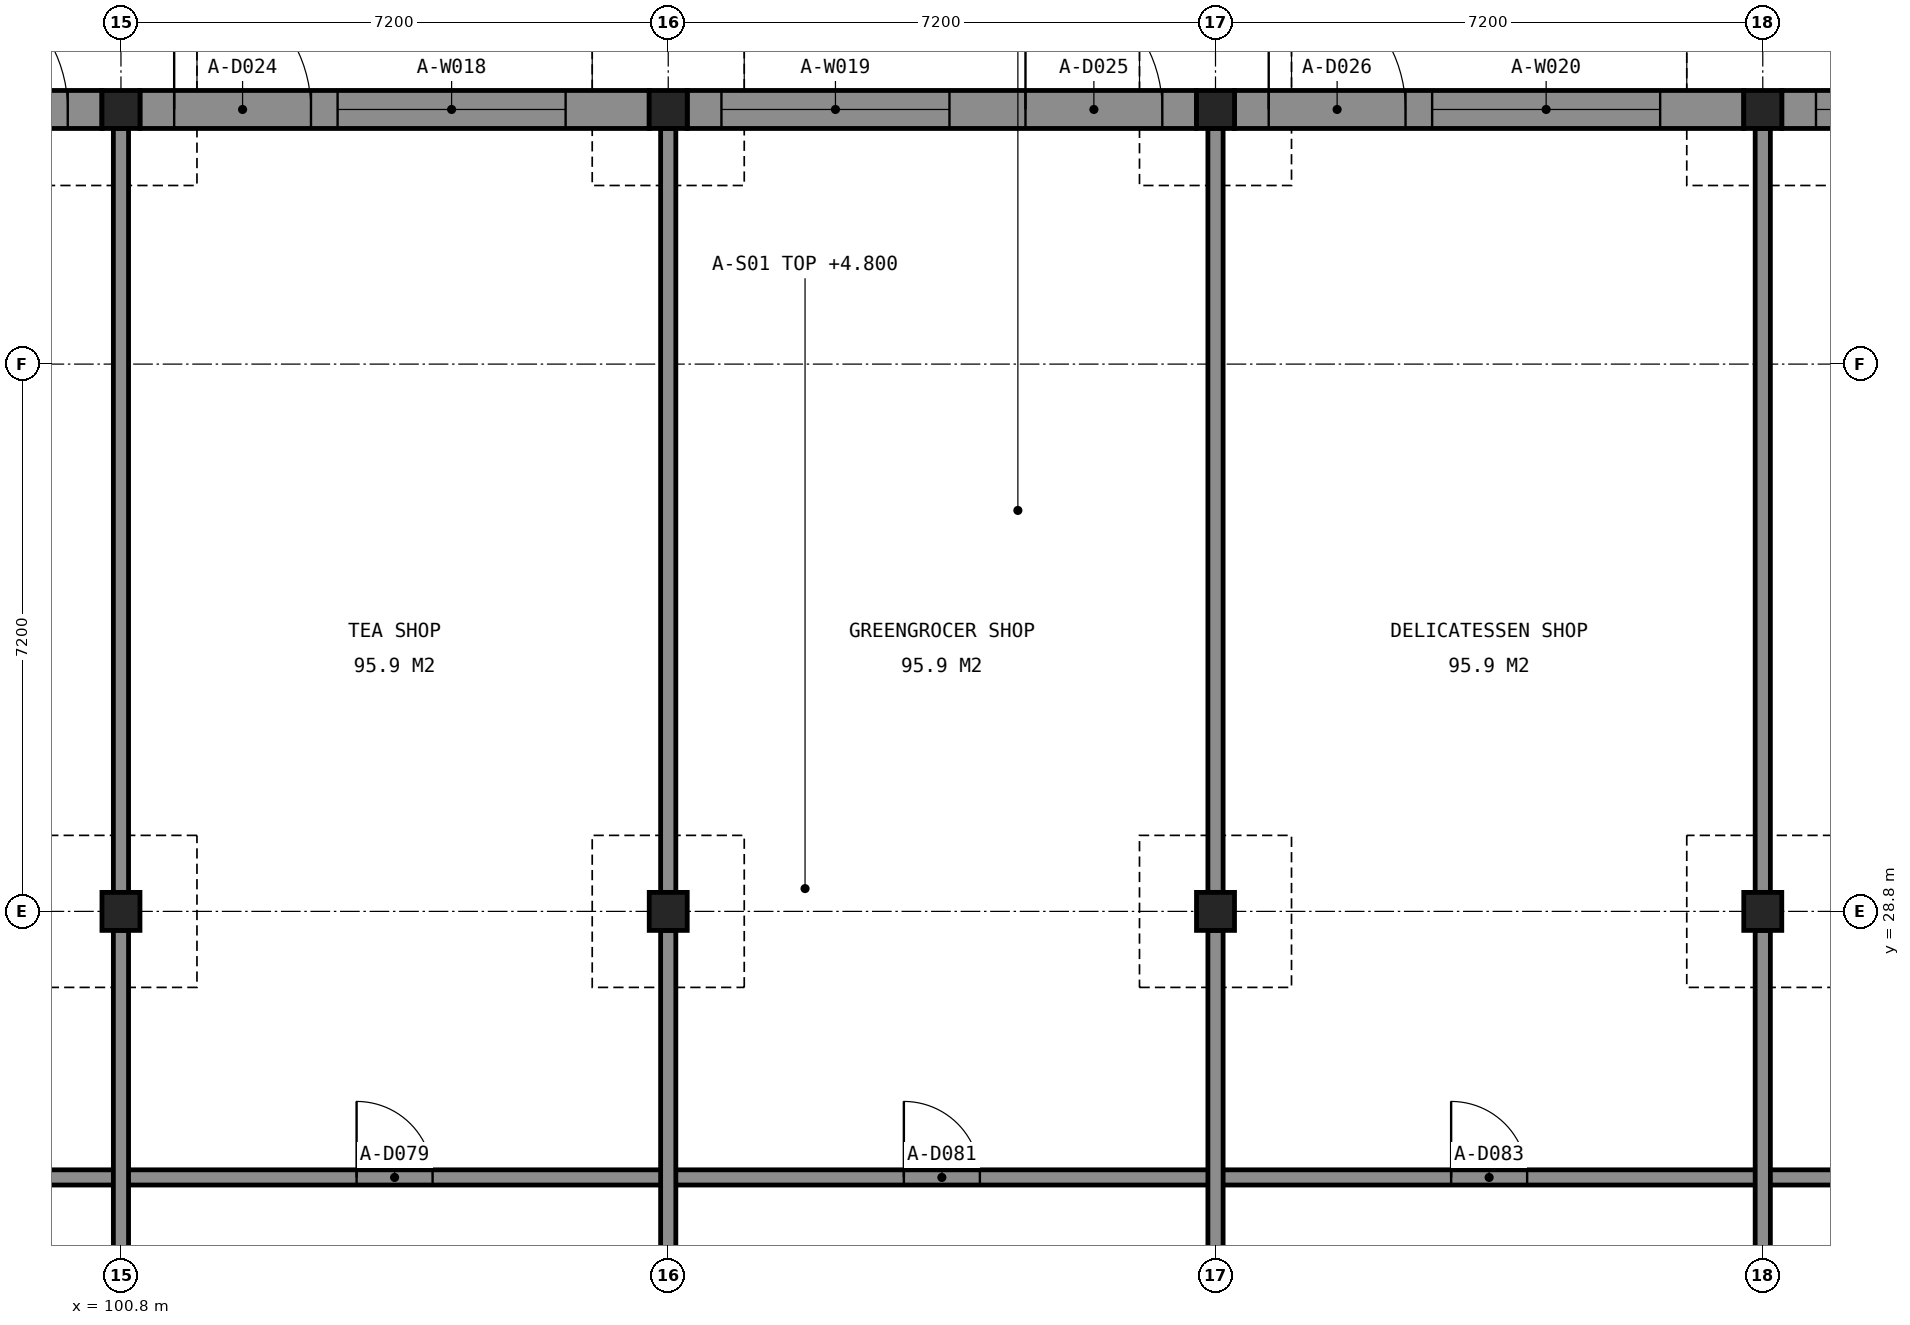
"""IFC4 building model, lengths in metres.
Left out: names, types, materials, properties, quantities, classifications, styles, units other than length and angle.
Written with IfcOpenShell. Run it as: python <this file> out.ifc"""

import sys

from ifc_helpers import new_model, si_unit, direction, frame, frame_2d, origin, origin_2d, place, context, subcontext, project, spatial, rectangle, extrude, element, fill, save


model = new_model("IFC4")
c1 = context("Model", 3, precision=1e-05, world=origin(), true_north=direction((0.0, 1.0)))
c2 = subcontext(c1, "Body", "Model", "MODEL_VIEW")
j1 = project(units=[si_unit("LENGTHUNIT", "METRE"), si_unit("PLANEANGLEUNIT", "RADIAN")], contexts=[c1])
p1 = place(None, origin())
s1 = spatial("IfcSite", under=j1, at=p1, CompositionType="ELEMENT")
p2 = place(p1, origin())
s2 = spatial("IfcBuilding", under=s1, at=p2, CompositionType="ELEMENT")
p3 = place(p2, origin())
s3 = spatial("IfcBuildingStorey", under=s2, at=p3, CompositionType="ELEMENT", Elevation=0.0)
for number, where, z_axis, x_axis in (
    (1, (100.8, 39.35, 0.0), (0.0, 0.0, 1.0), (1.0, 0.0, 0.0)),
    (2, (108.0, 39.35, 0.0), (0.0, 0.0, 1.0), (1.0, 0.0, 0.0)),
    (3, (115.2, 39.35, 0.0), (0.0, 0.0, 1.0), (1.0, 0.0, 0.0)),
    (4, (122.4, 39.35, 0.0), (0.0, 0.0, 1.0), (1.0, 0.0, 0.0)),
    (5, (100.8, 28.8, 0.0), (0.0, 0.0, 1.0), (1.0, 0.0, 0.0)),
    (6, (108.0, 28.8, 0.0), (0.0, 0.0, 1.0), (1.0, 0.0, 0.0)),
    (7, (115.2, 28.8, 0.0), (0.0, 0.0, 1.0), (1.0, 0.0, 0.0)),
    (8, (122.4, 28.8, 0.0), (0.0, 0.0, 1.0), (1.0, 0.0, 0.0)),
):
    element("IfcColumn", number, at=place(p3, frame(where, z_axis=z_axis, x_axis=x_axis)), inside=s3, PredefinedType="COLUMN", context=c2, shape_type="SweptSolid", body=[
        extrude(rectangle(XDim=0.5, YDim=0.5, at=origin_2d()), origin(), (0.0, 0.0, 1.0), 3.7),
    ])
p4 = place(p3, frame((93.85, 39.35, 0.0), z_axis=(0.0, 0.0, 1.0), x_axis=(1.0, 0.0, 0.0)))
e9 = element("IfcWall", 9, at=p4, inside=s3, PredefinedType="SOLIDWALL", context=c2, shape_type="SweptSolid", body=[
    extrude(rectangle(XDim=6.7, YDim=0.5, at=frame_2d((3.35, 0.0))), origin(), (0.0, 0.0, 1.0), 3.6),
])
p5 = place(p4, frame((4.45, 0.0, 0.0)))
e10 = element("IfcOpeningElement", 10, at=p5, cuts=e9, PredefinedType="OPENING", context=c2, shape_type="SweptSolid", body=[
    extrude(rectangle(XDim=1.8, YDim=2.4, at=frame_2d((0.9, 1.2))), frame((0.0, 0.26, 0.0), z_axis=(0.0, -1.0, 0.0), x_axis=(1.0, 0.0, 0.0)), (0.0, 0.0, 1.0), 0.52),
])
p6 = place(p4, frame((0.45, 0.0, 0.6)))
e11 = element("IfcOpeningElement", 11, at=p6, cuts=e9, PredefinedType="OPENING", context=c2, shape_type="SweptSolid", body=[
    extrude(rectangle(XDim=3.0, YDim=2.4, at=frame_2d((1.5, 1.2))), frame((0.0, 0.26, 0.0), z_axis=(0.0, -1.0, 0.0), x_axis=(1.0, 0.0, 0.0)), (0.0, 0.0, 1.0), 0.52),
])
p7 = place(p3, frame((101.05, 39.35, 0.0), z_axis=(0.0, 0.0, 1.0), x_axis=(1.0, 0.0, 0.0)))
e12 = element("IfcWall", 12, at=p7, inside=s3, PredefinedType="SOLIDWALL", context=c2, shape_type="SweptSolid", body=[
    extrude(rectangle(XDim=6.7, YDim=0.5, at=frame_2d((3.35, 0.0))), origin(), (0.0, 0.0, 1.0), 3.6),
])
p8 = place(p7, frame((0.45, 0.0, 0.0)))
e13 = element("IfcOpeningElement", 13, at=p8, cuts=e12, PredefinedType="OPENING", context=c2, shape_type="SweptSolid", body=[
    extrude(rectangle(XDim=1.8, YDim=2.4, at=frame_2d((0.9, 1.2))), frame((0.0, 0.26, 0.0), z_axis=(0.0, -1.0, 0.0), x_axis=(1.0, 0.0, 0.0)), (0.0, 0.0, 1.0), 0.52),
])
p9 = place(p7, frame((2.6, 0.0, 0.6)))
e14 = element("IfcOpeningElement", 14, at=p9, cuts=e12, PredefinedType="OPENING", context=c2, shape_type="SweptSolid", body=[
    extrude(rectangle(XDim=3.0, YDim=2.4, at=frame_2d((1.5, 1.2))), frame((0.0, 0.26, 0.0), z_axis=(0.0, -1.0, 0.0), x_axis=(1.0, 0.0, 0.0)), (0.0, 0.0, 1.0), 0.52),
])
p10 = place(p3, frame((108.25, 39.35, 0.0), z_axis=(0.0, 0.0, 1.0), x_axis=(1.0, 0.0, 0.0)))
e15 = element("IfcWall", 15, at=p10, inside=s3, PredefinedType="SOLIDWALL", context=c2, shape_type="SweptSolid", body=[
    extrude(rectangle(XDim=6.7, YDim=0.5, at=frame_2d((3.35, 0.0))), origin(), (0.0, 0.0, 1.0), 3.6),
])
p11 = place(p10, frame((4.45, 0.0, 0.0)))
e16 = element("IfcOpeningElement", 16, at=p11, cuts=e15, PredefinedType="OPENING", context=c2, shape_type="SweptSolid", body=[
    extrude(rectangle(XDim=1.8, YDim=2.4, at=frame_2d((0.9, 1.2))), frame((0.0, 0.26, 0.0), z_axis=(0.0, -1.0, 0.0), x_axis=(1.0, 0.0, 0.0)), (0.0, 0.0, 1.0), 0.52),
])
p12 = place(p10, frame((0.45, 0.0, 0.6)))
e17 = element("IfcOpeningElement", 17, at=p12, cuts=e15, PredefinedType="OPENING", context=c2, shape_type="SweptSolid", body=[
    extrude(rectangle(XDim=3.0, YDim=2.4, at=frame_2d((1.5, 1.2))), frame((0.0, 0.26, 0.0), z_axis=(0.0, -1.0, 0.0), x_axis=(1.0, 0.0, 0.0)), (0.0, 0.0, 1.0), 0.52),
])
p13 = place(p3, frame((115.45, 39.35, 0.0), z_axis=(0.0, 0.0, 1.0), x_axis=(1.0, 0.0, 0.0)))
e18 = element("IfcWall", 18, at=p13, inside=s3, PredefinedType="SOLIDWALL", context=c2, shape_type="SweptSolid", body=[
    extrude(rectangle(XDim=6.7, YDim=0.5, at=frame_2d((3.35, 0.0))), origin(), (0.0, 0.0, 1.0), 3.6),
])
p14 = place(p13, frame((0.45, 0.0, 0.0)))
e19 = element("IfcOpeningElement", 19, at=p14, cuts=e18, PredefinedType="OPENING", context=c2, shape_type="SweptSolid", body=[
    extrude(rectangle(XDim=1.8, YDim=2.4, at=frame_2d((0.9, 1.2))), frame((0.0, 0.26, 0.0), z_axis=(0.0, -1.0, 0.0), x_axis=(1.0, 0.0, 0.0)), (0.0, 0.0, 1.0), 0.52),
])
p15 = place(p13, frame((2.6, 0.0, 0.6)))
e20 = element("IfcOpeningElement", 20, at=p15, cuts=e18, PredefinedType="OPENING", context=c2, shape_type="SweptSolid", body=[
    extrude(rectangle(XDim=3.0, YDim=2.4, at=frame_2d((1.5, 1.2))), frame((0.0, 0.26, 0.0), z_axis=(0.0, -1.0, 0.0), x_axis=(1.0, 0.0, 0.0)), (0.0, 0.0, 1.0), 0.52),
])
p16 = place(p3, frame((122.65, 39.35, 0.0), z_axis=(0.0, 0.0, 1.0), x_axis=(1.0, 0.0, 0.0)))
e21 = element("IfcWall", 21, at=p16, inside=s3, PredefinedType="SOLIDWALL", context=c2, shape_type="SweptSolid", body=[
    extrude(rectangle(XDim=6.7, YDim=0.5, at=frame_2d((3.35, 0.0))), origin(), (0.0, 0.0, 1.0), 3.6),
])
p17 = place(p16, frame((4.45, 0.0, 0.0)))
e22 = element("IfcOpeningElement", 22, at=p17, cuts=e21, PredefinedType="OPENING", context=c2, shape_type="SweptSolid", body=[
    extrude(rectangle(XDim=1.8, YDim=2.4, at=frame_2d((0.9, 1.2))), frame((0.0, 0.26, 0.0), z_axis=(0.0, -1.0, 0.0), x_axis=(1.0, 0.0, 0.0)), (0.0, 0.0, 1.0), 0.52),
])
p18 = place(p16, frame((0.45, 0.0, 0.6)))
e23 = element("IfcOpeningElement", 23, at=p18, cuts=e21, PredefinedType="OPENING", context=c2, shape_type="SweptSolid", body=[
    extrude(rectangle(XDim=3.0, YDim=2.4, at=frame_2d((1.5, 1.2))), frame((0.0, 0.26, 0.0), z_axis=(0.0, -1.0, 0.0), x_axis=(1.0, 0.0, 0.0)), (0.0, 0.0, 1.0), 0.52),
])
p19 = place(p3, frame((57.7, 25.3, 0.0), z_axis=(0.0, 0.0, 1.0), x_axis=(1.0, 0.0, 0.0)))
e24 = element("IfcWall", 24, at=p19, inside=s3, PredefinedType="PARTITIONING", context=c2, shape_type="SweptSolid", body=[
    extrude(rectangle(XDim=86.2, YDim=0.2, at=frame_2d((43.1, 0.0))), origin(), (0.0, 0.0, 1.0), 3.5),
])
p20 = place(p19, frame((3.0, 0.0, 0.0)))
e25 = element("IfcOpeningElement", 25, at=p20, cuts=e24, PredefinedType="OPENING", context=c2, shape_type="SweptSolid", body=[
    extrude(rectangle(XDim=1.0, YDim=2.1, at=frame_2d((0.5, 1.05))), frame((0.0, 0.11, 0.0), z_axis=(0.0, -1.0, 0.0), x_axis=(1.0, 0.0, 0.0)), (0.0, 0.0, 1.0), 0.22),
])
p21 = place(p19, frame((10.2, 0.0, 0.0)))
e26 = element("IfcOpeningElement", 26, at=p21, cuts=e24, PredefinedType="OPENING", context=c2, shape_type="SweptSolid", body=[
    extrude(rectangle(XDim=1.0, YDim=2.1, at=frame_2d((0.5, 1.05))), frame((0.0, 0.11, 0.0), z_axis=(0.0, -1.0, 0.0), x_axis=(1.0, 0.0, 0.0)), (0.0, 0.0, 1.0), 0.22),
])
p22 = place(p19, frame((17.4, 0.0, 0.0)))
e27 = element("IfcOpeningElement", 27, at=p22, cuts=e24, PredefinedType="OPENING", context=c2, shape_type="SweptSolid", body=[
    extrude(rectangle(XDim=1.0, YDim=2.1, at=frame_2d((0.5, 1.05))), frame((0.0, 0.11, 0.0), z_axis=(0.0, -1.0, 0.0), x_axis=(1.0, 0.0, 0.0)), (0.0, 0.0, 1.0), 0.22),
])
p23 = place(p19, frame((24.6, 0.0, 0.0)))
e28 = element("IfcOpeningElement", 28, at=p23, cuts=e24, PredefinedType="OPENING", context=c2, shape_type="SweptSolid", body=[
    extrude(rectangle(XDim=1.0, YDim=2.1, at=frame_2d((0.5, 1.05))), frame((0.0, 0.11, 0.0), z_axis=(0.0, -1.0, 0.0), x_axis=(1.0, 0.0, 0.0)), (0.0, 0.0, 1.0), 0.22),
])
p24 = place(p19, frame((31.8, 0.0, 0.0)))
e29 = element("IfcOpeningElement", 29, at=p24, cuts=e24, PredefinedType="OPENING", context=c2, shape_type="SweptSolid", body=[
    extrude(rectangle(XDim=1.0, YDim=2.1, at=frame_2d((0.5, 1.05))), frame((0.0, 0.11, 0.0), z_axis=(0.0, -1.0, 0.0), x_axis=(1.0, 0.0, 0.0)), (0.0, 0.0, 1.0), 0.22),
])
p25 = place(p19, frame((39.0, 0.0, 0.0)))
e30 = element("IfcOpeningElement", 30, at=p25, cuts=e24, PredefinedType="OPENING", context=c2, shape_type="SweptSolid", body=[
    extrude(rectangle(XDim=1.0, YDim=2.1, at=frame_2d((0.5, 1.05))), frame((0.0, 0.11, 0.0), z_axis=(0.0, -1.0, 0.0), x_axis=(1.0, 0.0, 0.0)), (0.0, 0.0, 1.0), 0.22),
])
p26 = place(p19, frame((46.2, 0.0, 0.0)))
e31 = element("IfcOpeningElement", 31, at=p26, cuts=e24, PredefinedType="OPENING", context=c2, shape_type="SweptSolid", body=[
    extrude(rectangle(XDim=1.0, YDim=2.1, at=frame_2d((0.5, 1.05))), frame((0.0, 0.11, 0.0), z_axis=(0.0, -1.0, 0.0), x_axis=(1.0, 0.0, 0.0)), (0.0, 0.0, 1.0), 0.22),
])
p27 = place(p19, frame((53.4, 0.0, 0.0)))
e32 = element("IfcOpeningElement", 32, at=p27, cuts=e24, PredefinedType="OPENING", context=c2, shape_type="SweptSolid", body=[
    extrude(rectangle(XDim=1.0, YDim=2.1, at=frame_2d((0.5, 1.05))), frame((0.0, 0.11, 0.0), z_axis=(0.0, -1.0, 0.0), x_axis=(1.0, 0.0, 0.0)), (0.0, 0.0, 1.0), 0.22),
])
p28 = place(p19, frame((60.6, 0.0, 0.0)))
e33 = element("IfcOpeningElement", 33, at=p28, cuts=e24, PredefinedType="OPENING", context=c2, shape_type="SweptSolid", body=[
    extrude(rectangle(XDim=1.0, YDim=2.1, at=frame_2d((0.5, 1.05))), frame((0.0, 0.11, 0.0), z_axis=(0.0, -1.0, 0.0), x_axis=(1.0, 0.0, 0.0)), (0.0, 0.0, 1.0), 0.22),
])
p29 = place(p19, frame((67.8, 0.0, 0.0)))
e34 = element("IfcOpeningElement", 34, at=p29, cuts=e24, PredefinedType="OPENING", context=c2, shape_type="SweptSolid", body=[
    extrude(rectangle(XDim=1.0, YDim=2.1, at=frame_2d((0.5, 1.05))), frame((0.0, 0.11, 0.0), z_axis=(0.0, -1.0, 0.0), x_axis=(1.0, 0.0, 0.0)), (0.0, 0.0, 1.0), 0.22),
])
p30 = place(p19, frame((75.0, 0.0, 0.0)))
e35 = element("IfcOpeningElement", 35, at=p30, cuts=e24, PredefinedType="OPENING", context=c2, shape_type="SweptSolid", body=[
    extrude(rectangle(XDim=1.0, YDim=2.1, at=frame_2d((0.5, 1.05))), frame((0.0, 0.11, 0.0), z_axis=(0.0, -1.0, 0.0), x_axis=(1.0, 0.0, 0.0)), (0.0, 0.0, 1.0), 0.22),
])
p31 = place(p19, frame((84.65, 0.0, 0.0)))
e36 = element("IfcOpeningElement", 36, at=p31, cuts=e24, PredefinedType="OPENING", context=c2, shape_type="SweptSolid", body=[
    extrude(rectangle(XDim=0.9, YDim=2.1, at=frame_2d((0.45, 1.05))), frame((0.0, 0.11, 0.0), z_axis=(0.0, -1.0, 0.0), x_axis=(1.0, 0.0, 0.0)), (0.0, 0.0, 1.0), 0.22),
])
p32 = place(p3, frame((100.8, 20.6, 0.0), z_axis=(0.0, 0.0, 1.0), x_axis=(0.0, 1.0, 0.0)))
e37 = element("IfcWall", 37, at=p32, inside=s3, PredefinedType="PARTITIONING", context=c2, shape_type="SweptSolid", body=[
    extrude(rectangle(XDim=7.95, YDim=0.2, at=frame_2d((3.975, 0.0))), origin(), (0.0, 0.0, 1.0), 3.5),
])
p33 = place(p3, frame((100.8, 29.05, 0.0), z_axis=(0.0, 0.0, 1.0), x_axis=(0.0, 1.0, 0.0)))
e38 = element("IfcWall", 38, at=p33, inside=s3, PredefinedType="PARTITIONING", context=c2, shape_type="SweptSolid", body=[
    extrude(rectangle(XDim=10.05, YDim=0.2, at=frame_2d((5.025, 0.0))), origin(), (0.0, 0.0, 1.0), 3.5),
])
p34 = place(p3, frame((108.0, 20.6, 0.0), z_axis=(0.0, 0.0, 1.0), x_axis=(0.0, 1.0, 0.0)))
e39 = element("IfcWall", 39, at=p34, inside=s3, PredefinedType="PARTITIONING", context=c2, shape_type="SweptSolid", body=[
    extrude(rectangle(XDim=7.95, YDim=0.2, at=frame_2d((3.975, 0.0))), origin(), (0.0, 0.0, 1.0), 3.5),
])
p35 = place(p3, frame((108.0, 29.05, 0.0), z_axis=(0.0, 0.0, 1.0), x_axis=(0.0, 1.0, 0.0)))
e40 = element("IfcWall", 40, at=p35, inside=s3, PredefinedType="PARTITIONING", context=c2, shape_type="SweptSolid", body=[
    extrude(rectangle(XDim=10.05, YDim=0.2, at=frame_2d((5.025, 0.0))), origin(), (0.0, 0.0, 1.0), 3.5),
])
p36 = place(p3, frame((115.2, 20.6, 0.0), z_axis=(0.0, 0.0, 1.0), x_axis=(0.0, 1.0, 0.0)))
e41 = element("IfcWall", 41, at=p36, inside=s3, PredefinedType="PARTITIONING", context=c2, shape_type="SweptSolid", body=[
    extrude(rectangle(XDim=7.95, YDim=0.2, at=frame_2d((3.975, 0.0))), origin(), (0.0, 0.0, 1.0), 3.5),
])
p37 = place(p3, frame((115.2, 29.05, 0.0), z_axis=(0.0, 0.0, 1.0), x_axis=(0.0, 1.0, 0.0)))
e42 = element("IfcWall", 42, at=p37, inside=s3, PredefinedType="PARTITIONING", context=c2, shape_type="SweptSolid", body=[
    extrude(rectangle(XDim=10.05, YDim=0.2, at=frame_2d((5.025, 0.0))), origin(), (0.0, 0.0, 1.0), 3.5),
])
p38 = place(p3, frame((122.4, 20.6, 0.0), z_axis=(0.0, 0.0, 1.0), x_axis=(0.0, 1.0, 0.0)))
e43 = element("IfcWall", 43, at=p38, inside=s3, PredefinedType="PARTITIONING", context=c2, shape_type="SweptSolid", body=[
    extrude(rectangle(XDim=7.95, YDim=0.2, at=frame_2d((3.975, 0.0))), origin(), (0.0, 0.0, 1.0), 3.5),
])
p39 = place(p3, frame((122.4, 29.05, 0.0), z_axis=(0.0, 0.0, 1.0), x_axis=(0.0, 1.0, 0.0)))
e44 = element("IfcWall", 44, at=p39, inside=s3, PredefinedType="PARTITIONING", context=c2, shape_type="SweptSolid", body=[
    extrude(rectangle(XDim=10.05, YDim=0.2, at=frame_2d((5.025, 0.0))), origin(), (0.0, 0.0, 1.0), 3.5),
])
p40 = place(p5, origin())
e45 = element("IfcDoor", 45, at=p40, inside=s3, OperationType="DOUBLE_DOOR_DOUBLE_SWING", PredefinedType="DOOR", context=c2, shape_type="SweptSolid", body=[
    extrude(rectangle(XDim=1.8, YDim=2.4, at=frame_2d((0.9, 1.2))), frame((0.0, 0.025, 0.0), z_axis=(0.0, -1.0, 0.0), x_axis=(1.0, 0.0, 0.0)), (0.0, 0.0, 1.0), 0.05),
])
fill(e10, e45)
p41 = place(p8, origin())
e46 = element("IfcDoor", 46, at=p41, inside=s3, OperationType="DOUBLE_DOOR_DOUBLE_SWING", PredefinedType="DOOR", context=c2, shape_type="SweptSolid", body=[
    extrude(rectangle(XDim=1.8, YDim=2.4, at=frame_2d((0.9, 1.2))), frame((0.0, 0.025, 0.0), z_axis=(0.0, -1.0, 0.0), x_axis=(1.0, 0.0, 0.0)), (0.0, 0.0, 1.0), 0.05),
])
fill(e13, e46)
p42 = place(p9, origin())
e47 = element("IfcWindow", 47, at=p42, inside=s3, PartitioningType="SINGLE_PANEL", PredefinedType="WINDOW", context=c2, shape_type="SweptSolid", body=[
    extrude(rectangle(XDim=3.0, YDim=2.4, at=frame_2d((1.5, 1.2))), frame((0.0, 0.03, 0.0), z_axis=(0.0, -1.0, 0.0), x_axis=(1.0, 0.0, 0.0)), (0.0, 0.0, 1.0), 0.06),
])
fill(e14, e47)
p43 = place(p11, origin())
e48 = element("IfcDoor", 48, at=p43, inside=s3, OperationType="DOUBLE_DOOR_DOUBLE_SWING", PredefinedType="DOOR", context=c2, shape_type="SweptSolid", body=[
    extrude(rectangle(XDim=1.8, YDim=2.4, at=frame_2d((0.9, 1.2))), frame((0.0, 0.025, 0.0), z_axis=(0.0, -1.0, 0.0), x_axis=(1.0, 0.0, 0.0)), (0.0, 0.0, 1.0), 0.05),
])
fill(e16, e48)
p44 = place(p12, origin())
e49 = element("IfcWindow", 49, at=p44, inside=s3, PartitioningType="SINGLE_PANEL", PredefinedType="WINDOW", context=c2, shape_type="SweptSolid", body=[
    extrude(rectangle(XDim=3.0, YDim=2.4, at=frame_2d((1.5, 1.2))), frame((0.0, 0.03, 0.0), z_axis=(0.0, -1.0, 0.0), x_axis=(1.0, 0.0, 0.0)), (0.0, 0.0, 1.0), 0.06),
])
fill(e17, e49)
p45 = place(p14, origin())
e50 = element("IfcDoor", 50, at=p45, inside=s3, OperationType="DOUBLE_DOOR_DOUBLE_SWING", PredefinedType="DOOR", context=c2, shape_type="SweptSolid", body=[
    extrude(rectangle(XDim=1.8, YDim=2.4, at=frame_2d((0.9, 1.2))), frame((0.0, 0.025, 0.0), z_axis=(0.0, -1.0, 0.0), x_axis=(1.0, 0.0, 0.0)), (0.0, 0.0, 1.0), 0.05),
])
fill(e19, e50)
p46 = place(p15, origin())
e51 = element("IfcWindow", 51, at=p46, inside=s3, PartitioningType="SINGLE_PANEL", PredefinedType="WINDOW", context=c2, shape_type="SweptSolid", body=[
    extrude(rectangle(XDim=3.0, YDim=2.4, at=frame_2d((1.5, 1.2))), frame((0.0, 0.03, 0.0), z_axis=(0.0, -1.0, 0.0), x_axis=(1.0, 0.0, 0.0)), (0.0, 0.0, 1.0), 0.06),
])
fill(e20, e51)
p47 = place(p18, origin())
e52 = element("IfcWindow", 52, at=p47, inside=s3, PartitioningType="SINGLE_PANEL", PredefinedType="WINDOW", context=c2, shape_type="SweptSolid", body=[
    extrude(rectangle(XDim=3.0, YDim=2.4, at=frame_2d((1.5, 1.2))), frame((0.0, 0.03, 0.0), z_axis=(0.0, -1.0, 0.0), x_axis=(1.0, 0.0, 0.0)), (0.0, 0.0, 1.0), 0.06),
])
fill(e23, e52)
p48 = place(p26, origin())
e53 = element("IfcDoor", 53, at=p48, inside=s3, OperationType="SINGLE_SWING_LEFT", PredefinedType="DOOR", context=c2, shape_type="SweptSolid", body=[
    extrude(rectangle(XDim=1.0, YDim=2.1, at=frame_2d((0.5, 1.05))), frame((0.0, 0.025, 0.0), z_axis=(0.0, -1.0, 0.0), x_axis=(1.0, 0.0, 0.0)), (0.0, 0.0, 1.0), 0.05),
])
fill(e31, e53)
p49 = place(p27, origin())
e54 = element("IfcDoor", 54, at=p49, inside=s3, OperationType="SINGLE_SWING_LEFT", PredefinedType="DOOR", context=c2, shape_type="SweptSolid", body=[
    extrude(rectangle(XDim=1.0, YDim=2.1, at=frame_2d((0.5, 1.05))), frame((0.0, 0.025, 0.0), z_axis=(0.0, -1.0, 0.0), x_axis=(1.0, 0.0, 0.0)), (0.0, 0.0, 1.0), 0.05),
])
fill(e32, e54)
p50 = place(p28, origin())
e55 = element("IfcDoor", 55, at=p50, inside=s3, OperationType="SINGLE_SWING_LEFT", PredefinedType="DOOR", context=c2, shape_type="SweptSolid", body=[
    extrude(rectangle(XDim=1.0, YDim=2.1, at=frame_2d((0.5, 1.05))), frame((0.0, 0.025, 0.0), z_axis=(0.0, -1.0, 0.0), x_axis=(1.0, 0.0, 0.0)), (0.0, 0.0, 1.0), 0.05),
])
fill(e33, e55)
save(model, sys.argv[1])
